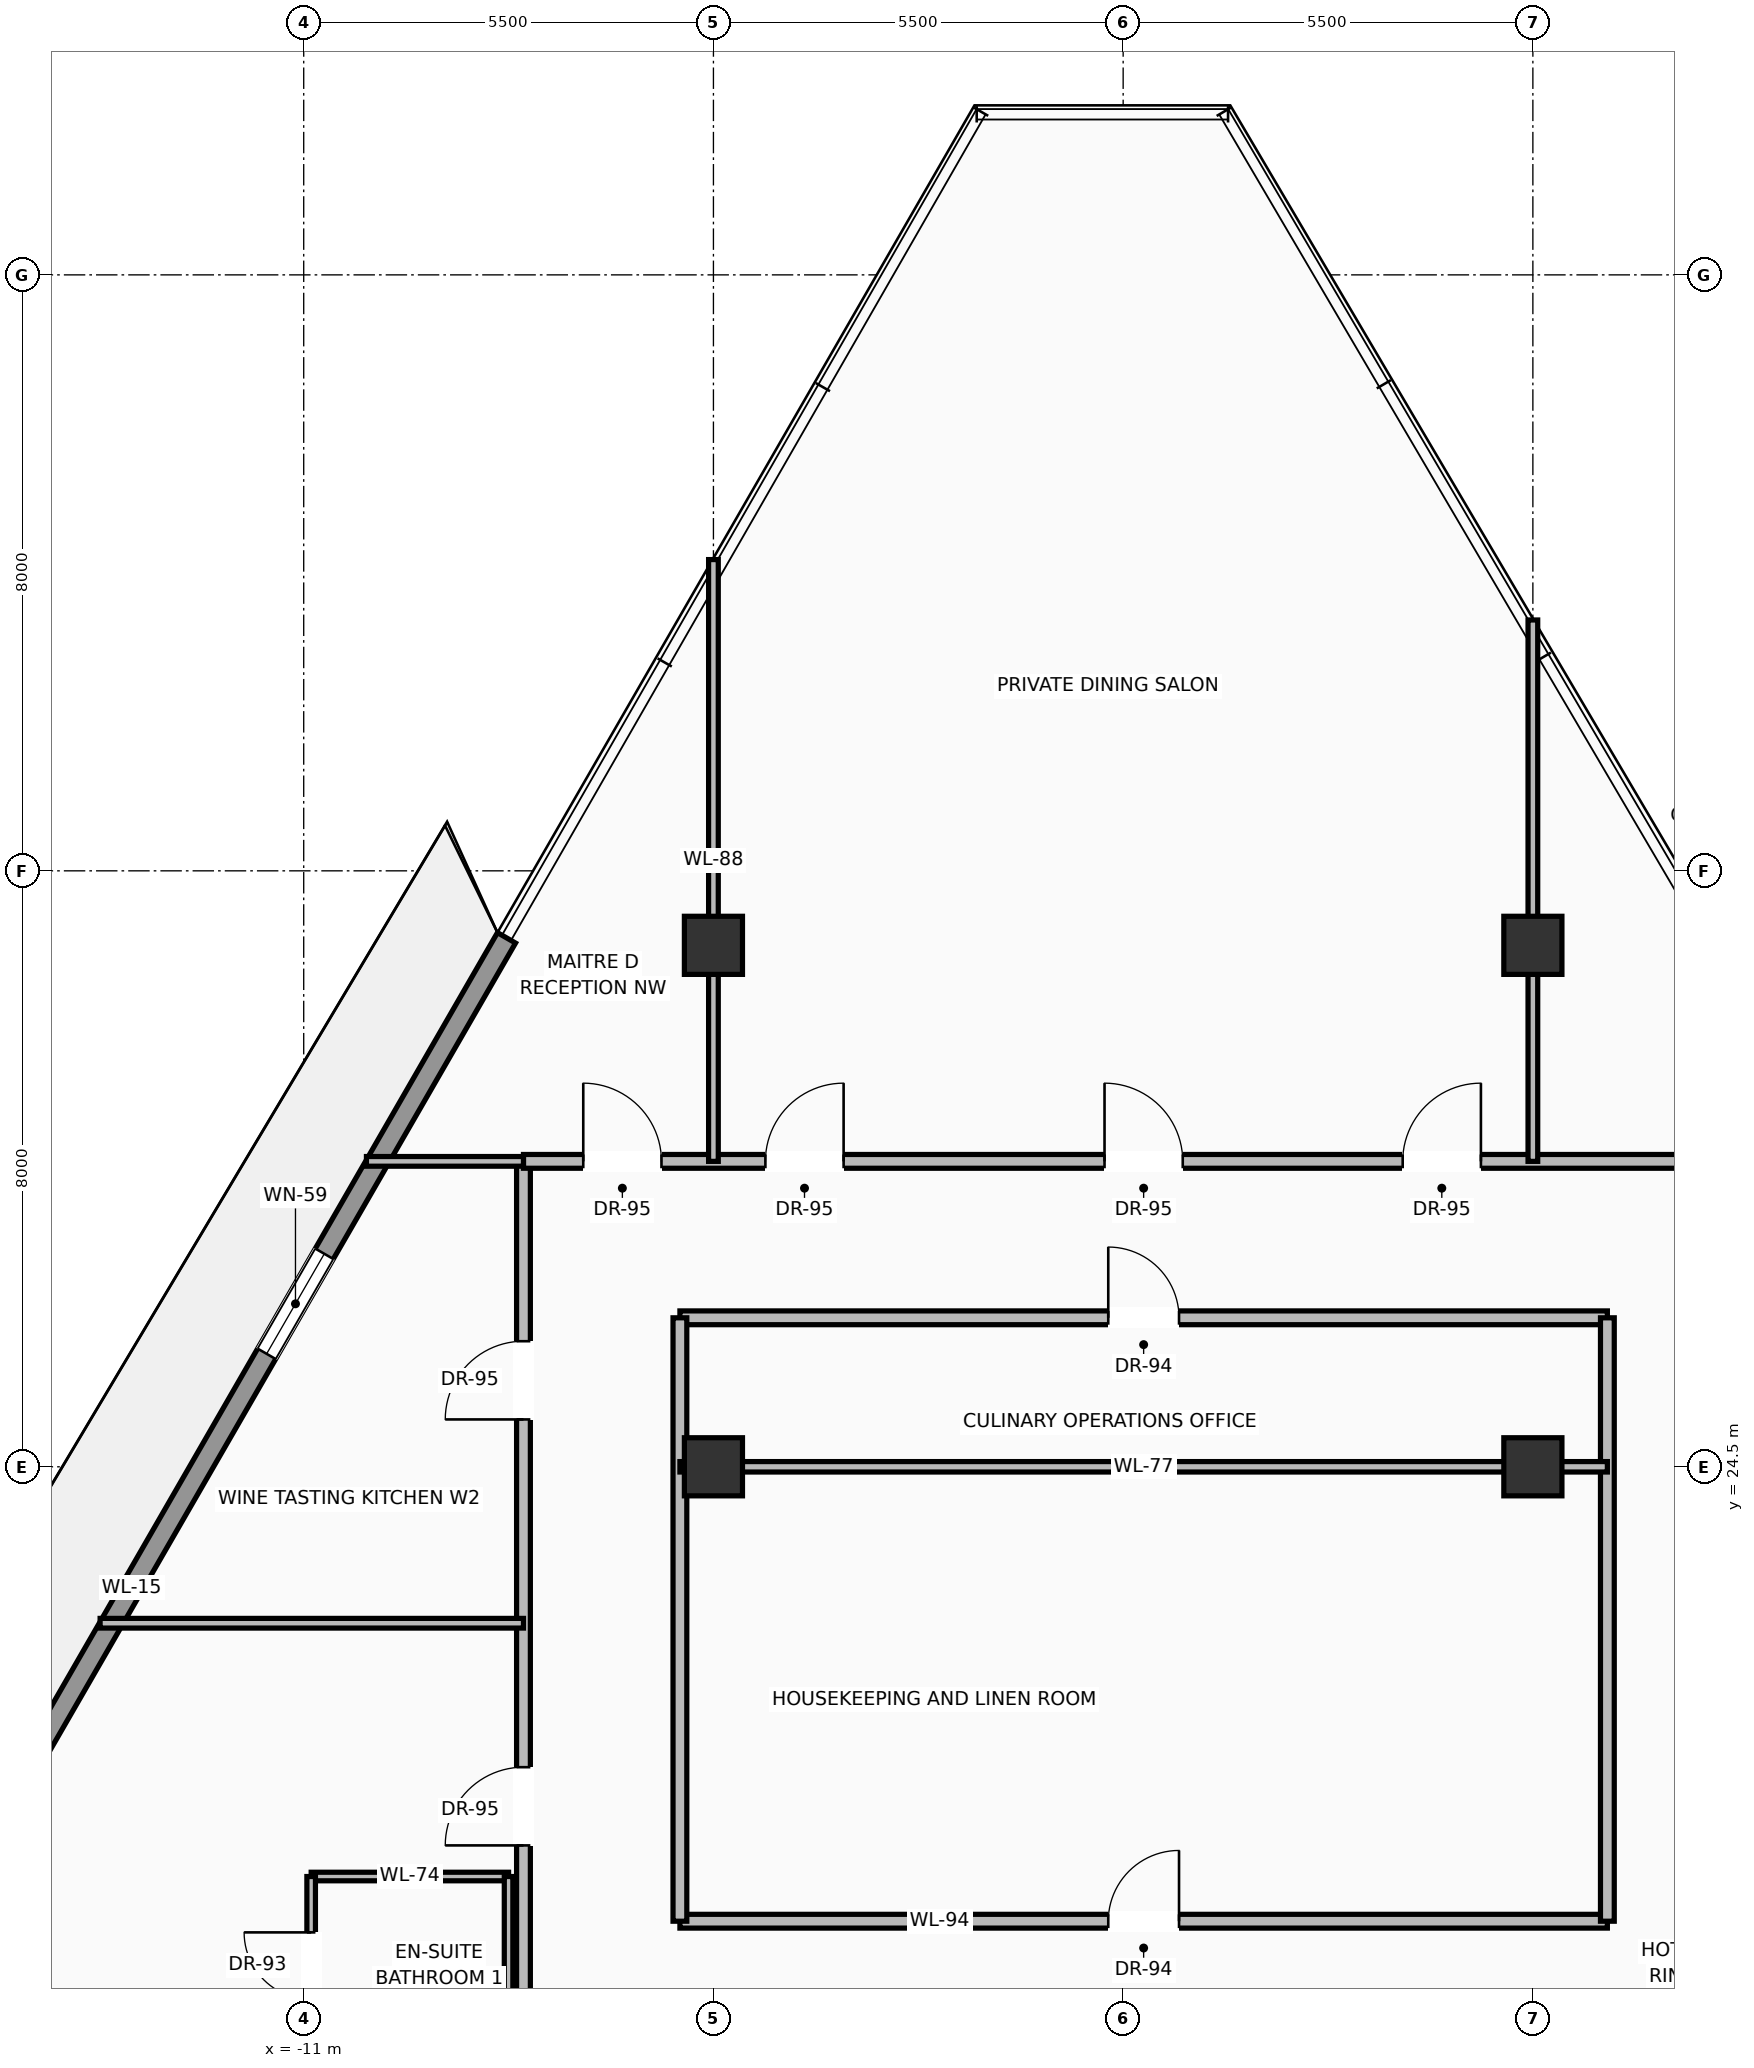
"""IFC4 building model, lengths in metres.
Left out: names, types, materials, properties, quantities, classifications, styles, units other than length and angle.
Written with IfcOpenShell. Run it as: python <this file> out.ifc"""

import sys

from ifc_helpers import new_model, si_unit, direction, frame, frame_2d, origin, origin_2d, place, context, subcontext, project, spatial, rectangle, extrude, source, transform, mapped, element, fill, save


model = new_model("IFC4")
c1 = context("Model", 3, precision=1e-05, world=origin(), true_north=direction((0.0, 1.0)))
c2 = subcontext(c1, "Body", "Model", "MODEL_VIEW")
j1 = project(units=[si_unit("LENGTHUNIT", "METRE"), si_unit("PLANEANGLEUNIT", "RADIAN")], contexts=[c1])
p1 = place(None, origin())
s1 = spatial("IfcSite", under=j1, at=p1, CompositionType="ELEMENT")
p2 = place(p1, origin())
s2 = spatial("IfcBuilding", under=s1, at=p2, CompositionType="ELEMENT")
p3 = place(p2, frame((0.0, 0.0, 279.9)))
s3 = spatial("IfcBuildingStorey", under=s2, at=p3, CompositionType="ELEMENT", Elevation=279.9)
m1 = source(origin(), c2, "Body", "SweptSolid", [
    extrude(rectangle(XDim=0.78, YDim=0.78, at=origin_2d()), origin(), (0.0, 0.0, 1.0), 3.45),
])
for number, where, z_axis, x_axis in (
    (1, (-5.5, 24.5, 0.0), (0.0, 0.0, 1.0), (1.0, 0.0, 0.0)),
    (2, (5.5, 24.5, 0.0), (0.0, 0.0, 1.0), (1.0, 0.0, 0.0)),
    (3, (-5.5, 31.5, 0.0), (0.0, 0.0, 1.0), (1.0, 0.0, 0.0)),
    (4, (5.5, 31.5, 0.0), (0.0, 0.0, 1.0), (1.0, 0.0, 0.0)),
):
    element("IfcColumn", number, at=place(p3, frame(where, z_axis=z_axis, x_axis=x_axis)), inside=s3, PredefinedType="COLUMN", context=c2, shape_type="MappedRepresentation", body=[
        mapped(m1, transform((0.0, 0.0, 0.0), scale=1.0)),
    ])
p4 = place(p3, frame((-18.34, 14.15, 0.0), z_axis=(0.0, 0.0, 1.0), x_axis=(0.499519590366, 0.866302590808, 0.0)))
e5 = element("IfcWall", 5, at=p4, inside=s3, PredefinedType="SOLIDWALL", context=c2, shape_type="SweptSolid", body=[
    extrude(rectangle(XDim=20.144, YDim=0.28, at=frame_2d((10.072, 0.0))), origin(), (0.0, 0.0, 1.0), 2.82),
])
p5 = place(p4, frame((4.834, 0.0, 0.0)))
e6 = element("IfcOpeningElement", 6, at=p5, cuts=e5, PredefinedType="OPENING", context=c2, shape_type="SweptSolid", body=[
    extrude(rectangle(XDim=1.6, YDim=2.35, at=frame_2d((0.8, 1.175))), frame((0.0, 0.15, 0.0), z_axis=(0.0, -1.0, 0.0), x_axis=(1.0, 0.0, 0.0)), (0.0, 0.0, 1.0), 0.3),
])
p6 = place(p4, frame((13.698, 0.0, 0.9)))
e7 = element("IfcOpeningElement", 7, at=p6, cuts=e5, PredefinedType="OPENING", context=c2, shape_type="SweptSolid", body=[
    extrude(rectangle(XDim=1.55, YDim=1.75, at=frame_2d((0.775, 0.875))), frame((0.0, 0.15, 0.0), z_axis=(0.0, -1.0, 0.0), x_axis=(1.0, 0.0, 0.0)), (0.0, 0.0, 1.0), 0.3),
])
p7 = place(p3, frame((-5.95, 18.4, 0.0), z_axis=(0.0, 0.0, 1.0), x_axis=(1.0, 0.0, 0.0)))
e8 = element("IfcWall", 8, at=p7, inside=s3, PredefinedType="PARTITIONING", context=c2, shape_type="SweptSolid", body=[
    extrude(rectangle(XDim=12.45, YDim=0.185, at=frame_2d((6.225, 0.0))), origin(), (0.0, 0.0, 1.0), 3.232),
])
p8 = place(p7, frame((5.75, 0.0, 0.0)))
e9 = element("IfcOpeningElement", 9, at=p8, cuts=e8, PredefinedType="OPENING", context=c2, shape_type="SweptSolid", body=[
    extrude(rectangle(XDim=0.95, YDim=2.2, at=frame_2d((0.475, 1.1))), frame((0.0, 0.103, 0.0), z_axis=(0.0, -1.0, 0.0), x_axis=(1.0, 0.0, 0.0)), (0.0, 0.0, 1.0), 0.205),
])
p9 = place(p3, frame((-5.95, 26.5, 0.0), z_axis=(0.0, 0.0, 1.0), x_axis=(1.0, 0.0, 0.0)))
e10 = element("IfcWall", 10, at=p9, inside=s3, PredefinedType="PARTITIONING", context=c2, shape_type="SweptSolid", body=[
    extrude(rectangle(XDim=12.45, YDim=0.185, at=frame_2d((6.225, 0.0))), origin(), (0.0, 0.0, 1.0), 3.232),
])
p10 = place(p9, frame((5.75, 0.0, 0.0)))
e11 = element("IfcOpeningElement", 11, at=p10, cuts=e10, PredefinedType="OPENING", context=c2, shape_type="SweptSolid", body=[
    extrude(rectangle(XDim=0.95, YDim=2.2, at=frame_2d((0.475, 1.1))), frame((0.0, 0.103, 0.0), z_axis=(0.0, -1.0, 0.0), x_axis=(1.0, 0.0, 0.0)), (0.0, 0.0, 1.0), 0.205),
])
for number, where, z_axis, x_axis in (
    (12, (-5.95, 18.4, 0.0), (0.0, 0.0, 1.0), (0.0, 1.0, 0.0)),
    (13, (6.5, 18.4, 0.0), (0.0, 0.0, 1.0), (0.0, 1.0, 0.0)),
):
    element("IfcWall", number, at=place(p3, frame(where, z_axis=z_axis, x_axis=x_axis)), inside=s3, PredefinedType="PARTITIONING", context=c2, shape_type="SweptSolid", body=[
        extrude(rectangle(XDim=8.1, YDim=0.185, at=frame_2d((4.05, 0.0))), origin(), (0.0, 0.0, 1.0), 3.232),
    ])
p11 = place(p3, frame((-8.05, 16.2, 0.0), z_axis=(0.0, 0.0, 1.0), x_axis=(0.0, 1.0, 0.0)))
e14 = element("IfcWall", 14, at=p11, inside=s3, PredefinedType="PARTITIONING", context=c2, shape_type="SweptSolid", body=[
    extrude(rectangle(XDim=12.4, YDim=0.185, at=frame_2d((6.2, 0.0))), origin(), (0.0, 0.0, 1.0), 3.232),
])
p12 = place(p11, frame((3.218, 0.0, 0.0)))
e15 = element("IfcOpeningElement", 15, at=p12, cuts=e14, PredefinedType="OPENING", context=c2, shape_type="SweptSolid", body=[
    extrude(rectangle(XDim=1.05, YDim=2.25, at=frame_2d((0.525, 1.125))), frame((0.0, 0.103, 0.0), z_axis=(0.0, -1.0, 0.0), x_axis=(1.0, 0.0, 0.0)), (0.0, 0.0, 1.0), 0.205),
])
p13 = place(p11, frame((8.936, 0.0, 0.0)))
e16 = element("IfcOpeningElement", 16, at=p13, cuts=e14, PredefinedType="OPENING", context=c2, shape_type="SweptSolid", body=[
    extrude(rectangle(XDim=1.05, YDim=2.25, at=frame_2d((0.525, 1.125))), frame((0.0, 0.103, 0.0), z_axis=(0.0, -1.0, 0.0), x_axis=(1.0, 0.0, 0.0)), (0.0, 0.0, 1.0), 0.205),
])
p14 = place(p3, frame((-8.05, 28.6, 0.0), z_axis=(0.0, 0.0, 1.0), x_axis=(1.0, 0.0, 0.0)))
e17 = element("IfcWall", 17, at=p14, inside=s3, PredefinedType="PARTITIONING", context=c2, shape_type="SweptSolid", body=[
    extrude(rectangle(XDim=16.65, YDim=0.185, at=frame_2d((8.325, 0.0))), origin(), (0.0, 0.0, 1.0), 3.232),
])
p15 = place(p14, frame((3.248, 0.0, 0.0)))
e18 = element("IfcOpeningElement", 18, at=p15, cuts=e17, PredefinedType="OPENING", context=c2, shape_type="SweptSolid", body=[
    extrude(rectangle(XDim=1.05, YDim=2.25, at=frame_2d((0.525, 1.125))), frame((0.0, 0.103, 0.0), z_axis=(0.0, -1.0, 0.0), x_axis=(1.0, 0.0, 0.0)), (0.0, 0.0, 1.0), 0.205),
])
p16 = place(p14, frame((7.8, 0.0, 0.0)))
e19 = element("IfcOpeningElement", 19, at=p16, cuts=e17, PredefinedType="OPENING", context=c2, shape_type="SweptSolid", body=[
    extrude(rectangle(XDim=1.05, YDim=2.25, at=frame_2d((0.525, 1.125))), frame((0.0, 0.103, 0.0), z_axis=(0.0, -1.0, 0.0), x_axis=(1.0, 0.0, 0.0)), (0.0, 0.0, 1.0), 0.205),
])
p17 = place(p14, frame((11.802, 0.0, 0.0)))
e20 = element("IfcOpeningElement", 20, at=p17, cuts=e17, PredefinedType="OPENING", context=c2, shape_type="SweptSolid", body=[
    extrude(rectangle(XDim=1.05, YDim=2.25, at=frame_2d((0.525, 1.125))), frame((0.0, 0.103, 0.0), z_axis=(0.0, -1.0, 0.0), x_axis=(1.0, 0.0, 0.0)), (0.0, 0.0, 1.0), 0.205),
])
p18 = place(p14, frame((0.802, 0.0, 0.0)))
e21 = element("IfcOpeningElement", 21, at=p18, cuts=e17, PredefinedType="OPENING", context=c2, shape_type="SweptSolid", body=[
    extrude(rectangle(XDim=1.05, YDim=2.25, at=frame_2d((0.525, 1.125))), frame((0.0, 0.103, 0.0), z_axis=(0.0, -1.0, 0.0), x_axis=(1.0, 0.0, 0.0)), (0.0, 0.0, 1.0), 0.205),
])
p19 = place(p3, frame((-5.95, 24.5, 0.0), z_axis=(0.0, 0.0, 1.0), x_axis=(1.0, 0.0, 0.0)))
e22 = element("IfcWall", 22, at=p19, inside=s3, PredefinedType="PARTITIONING", context=c2, shape_type="SweptSolid", body=[
    extrude(rectangle(XDim=12.45, YDim=0.14, at=frame_2d((6.225, 0.0))), origin(), (0.0, 0.0, 1.0), 2.683),
])
p20 = place(p3, frame((-10.158, 28.6, 0.0), z_axis=(0.0, 0.0, 1.0), x_axis=(1.0, 0.0, 0.0)))
e23 = element("IfcWall", 23, at=p20, inside=s3, PredefinedType="PARTITIONING", context=c2, shape_type="SweptSolid", body=[
    extrude(rectangle(XDim=2.108, YDim=0.13, at=frame_2d((1.054, 0.0))), origin(), (0.0, 0.0, 1.0), 3.232),
])
p21 = place(p3, frame((-5.5, 28.6, 0.0), z_axis=(0.0, 0.0, 1.0), x_axis=(0.0, 1.0, 0.0)))
e24 = element("IfcWall", 24, at=p21, inside=s3, PredefinedType="PARTITIONING", context=c2, shape_type="SweptSolid", body=[
    extrude(rectangle(XDim=8.078, YDim=0.13, at=frame_2d((4.039, 0.0))), origin(), (0.0, 0.0, 1.0), 2.683),
])
p22 = place(p3, frame((5.5, 28.6, 0.0), z_axis=(0.0, 0.0, 1.0), x_axis=(0.0, 1.0, 0.0)))
e25 = element("IfcWall", 25, at=p22, inside=s3, PredefinedType="PARTITIONING", context=c2, shape_type="SweptSolid", body=[
    extrude(rectangle(XDim=7.267, YDim=0.13, at=frame_2d((3.634, 0.0))), origin(), (0.0, 0.0, 1.0), 2.683),
])
p23 = place(p3, frame((-10.9, 19.0, 0.0), z_axis=(0.0, 0.0, 1.0), x_axis=(1.0, 0.0, 0.0)))
e26 = element("IfcWall", 26, at=p23, inside=s3, PredefinedType="PARTITIONING", context=c2, shape_type="SweptSolid", body=[
    extrude(rectangle(XDim=2.65, YDim=0.115, at=frame_2d((1.325, 0.0))), origin(), (0.0, 0.0, 1.0), 3.232),
])
p24 = place(p3, frame((-10.9, 16.6, 0.0), z_axis=(0.0, 0.0, 1.0), x_axis=(0.0, 1.0, 0.0)))
e27 = element("IfcWall", 27, at=p24, inside=s3, PredefinedType="PARTITIONING", context=c2, shape_type="SweptSolid", body=[
    extrude(rectangle(XDim=2.4, YDim=0.115, at=frame_2d((1.2, 0.0))), origin(), (0.0, 0.0, 1.0), 3.232),
])
p25 = place(p24, frame((0.75, 0.0, 0.0)))
e28 = element("IfcOpeningElement", 28, at=p25, cuts=e27, PredefinedType="OPENING", context=c2, shape_type="SweptSolid", body=[
    extrude(rectangle(XDim=0.9, YDim=2.15, at=frame_2d((0.45, 1.075))), frame((0.0, 0.067, 0.0), z_axis=(0.0, -1.0, 0.0), x_axis=(1.0, 0.0, 0.0)), (0.0, 0.0, 1.0), 0.135),
])
p26 = place(p3, frame((-8.25, 16.6, 0.0), z_axis=(0.0, 0.0, 1.0), x_axis=(0.0, 1.0, 0.0)))
e29 = element("IfcWall", 29, at=p26, inside=s3, PredefinedType="PARTITIONING", context=c2, shape_type="SweptSolid", body=[
    extrude(rectangle(XDim=2.4, YDim=0.115, at=frame_2d((1.2, 0.0))), origin(), (0.0, 0.0, 1.0), 3.232),
])
p27 = place(p3, frame((-13.733, 22.4, 0.0), z_axis=(0.0, 0.0, 1.0), x_axis=(1.0, 0.0, 0.0)))
e30 = element("IfcWall", 30, at=p27, inside=s3, PredefinedType="PARTITIONING", context=c2, shape_type="SweptSolid", body=[
    extrude(rectangle(XDim=5.683, YDim=0.13, at=frame_2d((2.842, 0.0))), origin(), (0.0, 0.0, 1.0), 3.232),
])
m2 = source(origin(), c2, "Body", "SweptSolid", [
    extrude(rectangle(XDim=1.55, YDim=1.75, at=frame_2d((0.775, 0.875))), frame((0.0, 0.03, 0.0), z_axis=(0.0, -1.0, 0.0), x_axis=(1.0, 0.0, 0.0)), (0.0, 0.0, 1.0), 0.06),
])
p28 = place(p6, origin())
e31 = element("IfcWindow", 31, at=p28, inside=s3, PartitioningType="SINGLE_PANEL", PredefinedType="WINDOW", context=c2, shape_type="MappedRepresentation", body=[
    mapped(m2, transform((0.0, 0.0, 0.0), scale=1.0)),
])
fill(e7, e31)
m3 = source(origin(), c2, "Body", "SweptSolid", [
    extrude(rectangle(XDim=0.95, YDim=2.2, at=frame_2d((0.475, 1.1))), frame((0.0, 0.025, 0.0), z_axis=(0.0, -1.0, 0.0), x_axis=(1.0, 0.0, 0.0)), (0.0, 0.0, 1.0), 0.05),
])
p29 = place(p8, origin())
e32 = element("IfcDoor", 32, at=p29, inside=s3, OperationType="SINGLE_SWING_RIGHT", PredefinedType="DOOR", context=c2, shape_type="MappedRepresentation", body=[
    mapped(m3, transform((0.0, 0.0, 0.0), scale=1.0)),
])
fill(e9, e32)
p30 = place(p10, origin())
e33 = element("IfcDoor", 33, at=p30, inside=s3, OperationType="SINGLE_SWING_LEFT", PredefinedType="DOOR", context=c2, shape_type="MappedRepresentation", body=[
    mapped(m3, transform((0.0, 0.0, 0.0), scale=1.0)),
])
fill(e11, e33)
m4 = source(origin(), c2, "Body", "SweptSolid", [
    extrude(rectangle(XDim=1.05, YDim=2.25, at=frame_2d((0.525, 1.125))), frame((0.0, 0.025, 0.0), z_axis=(0.0, -1.0, 0.0), x_axis=(1.0, 0.0, 0.0)), (0.0, 0.0, 1.0), 0.05),
])
p31 = place(p12, origin())
e34 = element("IfcDoor", 34, at=p31, inside=s3, OperationType="SINGLE_SWING_LEFT", PredefinedType="DOOR", context=c2, shape_type="MappedRepresentation", body=[
    mapped(m4, transform((0.0, 0.0, 0.0), scale=1.0)),
])
fill(e15, e34)
m5 = source(origin(), c2, "Body", "SweptSolid", [
    extrude(rectangle(XDim=0.9, YDim=2.15, at=frame_2d((0.45, 1.075))), frame((0.0, 0.025, 0.0), z_axis=(0.0, -1.0, 0.0), x_axis=(1.0, 0.0, 0.0)), (0.0, 0.0, 1.0), 0.05),
])
p32 = place(p25, origin())
e35 = element("IfcDoor", 35, at=p32, inside=s3, OperationType="SINGLE_SWING_RIGHT", PredefinedType="DOOR", context=c2, shape_type="MappedRepresentation", body=[
    mapped(m5, transform((0.0, 0.0, 0.0), scale=1.0)),
])
fill(e28, e35)
p33 = place(p13, origin())
e36 = element("IfcDoor", 36, at=p33, inside=s3, OperationType="SINGLE_SWING_LEFT", PredefinedType="DOOR", context=c2, shape_type="MappedRepresentation", body=[
    mapped(m4, transform((0.0, 0.0, 0.0), scale=1.0)),
])
fill(e16, e36)
p34 = place(p15, origin())
e37 = element("IfcDoor", 37, at=p34, inside=s3, OperationType="SINGLE_SWING_RIGHT", PredefinedType="DOOR", context=c2, shape_type="MappedRepresentation", body=[
    mapped(m4, transform((0.0, 0.0, 0.0), scale=1.0)),
])
fill(e18, e37)
p35 = place(p16, origin())
e38 = element("IfcDoor", 38, at=p35, inside=s3, OperationType="SINGLE_SWING_LEFT", PredefinedType="DOOR", context=c2, shape_type="MappedRepresentation", body=[
    mapped(m4, transform((0.0, 0.0, 0.0), scale=1.0)),
])
fill(e19, e38)
p36 = place(p17, origin())
e39 = element("IfcDoor", 39, at=p36, inside=s3, OperationType="SINGLE_SWING_RIGHT", PredefinedType="DOOR", context=c2, shape_type="MappedRepresentation", body=[
    mapped(m4, transform((0.0, 0.0, 0.0), scale=1.0)),
])
fill(e20, e39)
p37 = place(p18, origin())
e40 = element("IfcDoor", 40, at=p37, inside=s3, OperationType="SINGLE_SWING_LEFT", PredefinedType="DOOR", context=c2, shape_type="MappedRepresentation", body=[
    mapped(m4, transform((0.0, 0.0, 0.0), scale=1.0)),
])
fill(e21, e40)
save(model, sys.argv[1])
